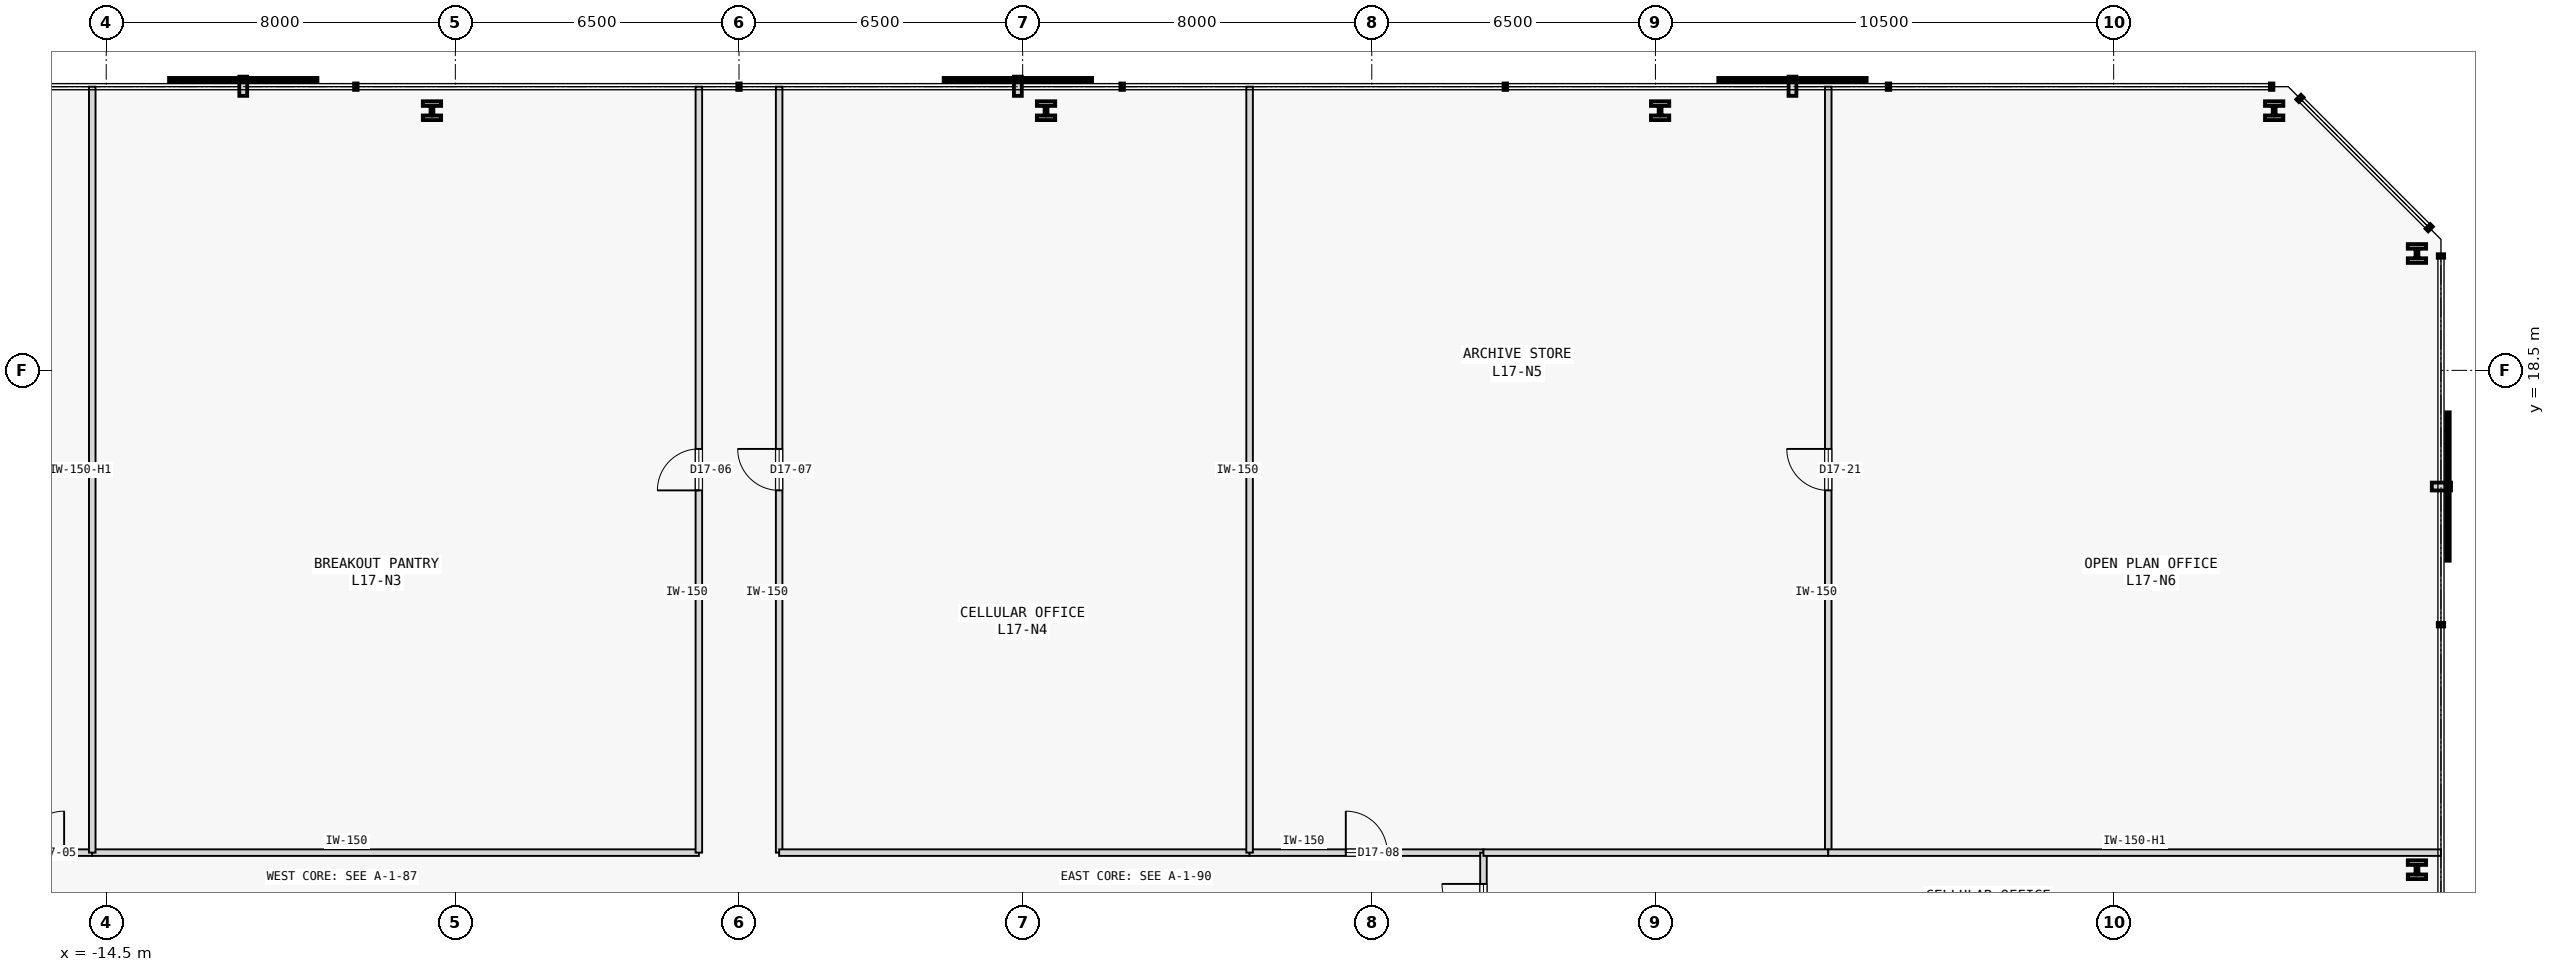
"""IFC4 building model, lengths in metres.
Left out: names, types, materials, properties, quantities, classifications, styles, units other than length and angle.
Written with IfcOpenShell. Run it as: python <this file> out.ifc"""

import sys

from ifc_helpers import new_model, si_unit, direction, frame, frame_2d, origin, origin_2d, place, context, subcontext, project, spatial, rectangle, i_section, extrude, element, fill, save


model = new_model("IFC4")
c1 = context("Model", 3, precision=1e-05, world=origin(), true_north=direction((0.0, 1.0)))
c2 = subcontext(c1, "Body", "Model", "MODEL_VIEW")
j1 = project(units=[si_unit("LENGTHUNIT", "METRE"), si_unit("PLANEANGLEUNIT", "RADIAN")], contexts=[c1])
p1 = place(None, origin())
s1 = spatial("IfcSite", under=j1, at=p1, CompositionType="ELEMENT")
p2 = place(p1, origin())
s2 = spatial("IfcBuilding", under=s1, at=p2, CompositionType="ELEMENT")
p3 = place(p2, frame((0.0, 0.0, 71.2)))
s3 = spatial("IfcBuildingStorey", under=s2, at=p3, CompositionType="ELEMENT", Elevation=71.2)
for number, where, z_axis, x_axis in (
    (1, (38.45, 7.059, 0.0), (0.0, 0.0, 1.0), (1.0, 0.0, 0.0)),
    (2, (38.45, 21.178, 0.0), (0.0, 0.0, 1.0), (1.0, 0.0, 0.0)),
    (3, (35.178, 24.45, 0.0), (0.0, 0.0, 1.0), (1.0, 0.0, 0.0)),
    (4, (21.107, 24.45, 0.0), (0.0, 0.0, 1.0), (1.0, 0.0, 0.0)),
    (5, (7.036, 24.45, 0.0), (0.0, 0.0, 1.0), (1.0, 0.0, 0.0)),
    (6, (-7.036, 24.45, 0.0), (0.0, 0.0, 1.0), (1.0, 0.0, 0.0)),
):
    element("IfcColumn", number, at=place(p3, frame(where, z_axis=z_axis, x_axis=x_axis)), inside=s3, PredefinedType="COLUMN", context=c2, shape_type="SweptSolid", body=[
        extrude(i_section(OverallWidth=0.42, OverallDepth=0.431, WebThickness=0.065, FlangeThickness=0.106, FilletRadius=0.015, at=origin_2d()), origin(), (0.0, 0.0, 1.0), 3.8),
    ])
p4 = place(p3, frame((-17.059, 7.45, 0.0), z_axis=(0.0, 0.0, 1.0), x_axis=(1.0, 0.0, 0.0)))
e7 = element("IfcWall", 7, at=p4, inside=s3, PredefinedType="PARTITIONING", context=c2, shape_type="SweptSolid", body=[
    extrude(rectangle(XDim=2.239, YDim=0.15, at=frame_2d((1.12, 0.0))), origin(), (0.0, 0.0, 1.0), 3.575),
])
p5 = place(p4, frame((0.645, 0.0, 0.0)))
e8 = element("IfcOpeningElement", 8, at=p5, cuts=e7, PredefinedType="OPENING", context=c2, shape_type="SweptSolid", body=[
    extrude(rectangle(XDim=0.95, YDim=2.15, at=frame_2d((0.475, 1.075))), frame((0.0, 0.085, 0.0), z_axis=(0.0, -1.0, 0.0), x_axis=(1.0, 0.0, 0.0)), (0.0, 0.0, 1.0), 0.17),
])
p6 = place(p3, frame((-14.82, 7.45, 0.0), z_axis=(0.0, 0.0, 1.0), x_axis=(1.0, 0.0, 0.0)))
e9 = element("IfcWall", 9, at=p6, inside=s3, PredefinedType="PARTITIONING", context=c2, shape_type="SweptSolid", body=[
    extrude(rectangle(XDim=13.9, YDim=0.15, at=frame_2d((6.95, 0.0))), origin(), (0.0, 0.0, 1.0), 3.575),
])
p7 = place(p3, frame((-0.92, 7.45, 0.0), z_axis=(0.0, 0.0, 1.0), x_axis=(0.0, 1.0, 0.0)))
e10 = element("IfcWall", 10, at=p7, inside=s3, PredefinedType="PARTITIONING", context=c2, shape_type="SweptSolid", body=[
    extrude(rectangle(XDim=17.55, YDim=0.15, at=frame_2d((8.775, 0.0))), origin(), (0.0, 0.0, 1.0), 3.575),
])
p8 = place(p7, frame((8.3, 0.0, 0.0)))
e11 = element("IfcOpeningElement", 11, at=p8, cuts=e10, PredefinedType="OPENING", context=c2, shape_type="SweptSolid", body=[
    extrude(rectangle(XDim=0.95, YDim=2.15, at=frame_2d((0.475, 1.075))), frame((0.0, 0.085, 0.0), z_axis=(0.0, -1.0, 0.0), x_axis=(1.0, 0.0, 0.0)), (0.0, 0.0, 1.0), 0.17),
])
p9 = place(p3, frame((0.92, 7.45, 0.0), z_axis=(0.0, 0.0, 1.0), x_axis=(0.0, 1.0, 0.0)))
e12 = element("IfcWall", 12, at=p9, inside=s3, PredefinedType="PARTITIONING", context=c2, shape_type="SweptSolid", body=[
    extrude(rectangle(XDim=17.55, YDim=0.15, at=frame_2d((8.775, 0.0))), origin(), (0.0, 0.0, 1.0), 3.575),
])
p10 = place(p9, frame((8.3, 0.0, 0.0)))
e13 = element("IfcOpeningElement", 13, at=p10, cuts=e12, PredefinedType="OPENING", context=c2, shape_type="SweptSolid", body=[
    extrude(rectangle(XDim=0.95, YDim=2.15, at=frame_2d((0.475, 1.075))), frame((0.0, 0.085, 0.0), z_axis=(0.0, -1.0, 0.0), x_axis=(1.0, 0.0, 0.0)), (0.0, 0.0, 1.0), 0.17),
])
p11 = place(p3, frame((0.92, 7.45, 0.0), z_axis=(0.0, 0.0, 1.0), x_axis=(1.0, 0.0, 0.0)))
e14 = element("IfcWall", 14, at=p11, inside=s3, PredefinedType="PARTITIONING", context=c2, shape_type="SweptSolid", body=[
    extrude(rectangle(XDim=10.78, YDim=0.15, at=frame_2d((5.39, 0.0))), origin(), (0.0, 0.0, 1.0), 3.575),
])
p12 = place(p3, frame((11.7, 7.45, 0.0), z_axis=(0.0, 0.0, 1.0), x_axis=(1.0, 0.0, 0.0)))
e15 = element("IfcWall", 15, at=p12, inside=s3, PredefinedType="PARTITIONING", context=c2, shape_type="SweptSolid", body=[
    extrude(rectangle(XDim=5.359, YDim=0.15, at=frame_2d((2.68, 0.0))), origin(), (0.0, 0.0, 1.0), 3.575),
])
p13 = place(p12, frame((2.205, 0.0, 0.0)))
e16 = element("IfcOpeningElement", 16, at=p13, cuts=e15, PredefinedType="OPENING", context=c2, shape_type="SweptSolid", body=[
    extrude(rectangle(XDim=0.95, YDim=2.15, at=frame_2d((0.475, 1.075))), frame((0.0, 0.085, 0.0), z_axis=(0.0, -1.0, 0.0), x_axis=(1.0, 0.0, 0.0)), (0.0, 0.0, 1.0), 0.17),
])
p14 = place(p3, frame((17.059, 5.066, 0.0), z_axis=(0.0, 0.0, 1.0), x_axis=(0.0, 1.0, 0.0)))
e17 = element("IfcWall", 17, at=p14, inside=s3, PredefinedType="PARTITIONING", context=c2, shape_type="SweptSolid", body=[
    extrude(rectangle(XDim=2.384, YDim=0.15, at=frame_2d((1.192, 0.0))), origin(), (0.0, 0.0, 1.0), 3.575),
])
p15 = place(p14, frame((0.717, 0.0, 0.0)))
e18 = element("IfcOpeningElement", 18, at=p15, cuts=e17, PredefinedType="OPENING", context=c2, shape_type="SweptSolid", body=[
    extrude(rectangle(XDim=0.95, YDim=2.15, at=frame_2d((0.475, 1.075))), frame((0.0, 0.085, 0.0), z_axis=(0.0, -1.0, 0.0), x_axis=(1.0, 0.0, 0.0)), (0.0, 0.0, 1.0), 0.17),
])
p16 = place(p3, frame((-14.82, 7.45, 0.0), z_axis=(0.0, 0.0, 1.0), x_axis=(0.0, 1.0, 0.0)))
e19 = element("IfcWall", 19, at=p16, inside=s3, PredefinedType="PARTITIONING", context=c2, shape_type="SweptSolid", body=[
    extrude(rectangle(XDim=17.55, YDim=0.15, at=frame_2d((8.775, 0.0))), origin(), (0.0, 0.0, 1.0), 3.125),
])
p17 = place(p3, frame((11.7, 7.45, 0.0), z_axis=(0.0, 0.0, 1.0), x_axis=(0.0, 1.0, 0.0)))
e20 = element("IfcWall", 20, at=p17, inside=s3, PredefinedType="PARTITIONING", context=c2, shape_type="SweptSolid", body=[
    extrude(rectangle(XDim=17.55, YDim=0.15, at=frame_2d((8.775, 0.0))), origin(), (0.0, 0.0, 1.0), 3.575),
])
p18 = place(p3, frame((24.96, 7.45, 0.0), z_axis=(0.0, 0.0, 1.0), x_axis=(0.0, 1.0, 0.0)))
e21 = element("IfcWall", 21, at=p18, inside=s3, PredefinedType="PARTITIONING", context=c2, shape_type="SweptSolid", body=[
    extrude(rectangle(XDim=17.55, YDim=0.15, at=frame_2d((8.775, 0.0))), origin(), (0.0, 0.0, 1.0), 3.575),
])
p19 = place(p18, frame((8.3, 0.0, 0.0)))
e22 = element("IfcOpeningElement", 22, at=p19, cuts=e21, PredefinedType="OPENING", context=c2, shape_type="SweptSolid", body=[
    extrude(rectangle(XDim=0.95, YDim=2.15, at=frame_2d((0.475, 1.075))), frame((0.0, 0.085, 0.0), z_axis=(0.0, -1.0, 0.0), x_axis=(1.0, 0.0, 0.0)), (0.0, 0.0, 1.0), 0.17),
])
p20 = place(p3, frame((17.059, 7.45, 0.0), z_axis=(0.0, 0.0, 1.0), x_axis=(1.0, 0.0, 0.0)))
e23 = element("IfcWall", 23, at=p20, inside=s3, PredefinedType="PARTITIONING", context=c2, shape_type="SweptSolid", body=[
    extrude(rectangle(XDim=7.901, YDim=0.15, at=frame_2d((3.95, 0.0))), origin(), (0.0, 0.0, 1.0), 3.575),
])
p21 = place(p3, frame((24.96, 7.45, 0.0), z_axis=(0.0, 0.0, 1.0), x_axis=(1.0, 0.0, 0.0)))
e24 = element("IfcWall", 24, at=p21, inside=s3, PredefinedType="PARTITIONING", context=c2, shape_type="SweptSolid", body=[
    extrude(rectangle(XDim=14.04, YDim=0.15, at=frame_2d((7.02, 0.0))), origin(), (0.0, 0.0, 1.0), 3.125),
])
p22 = place(p5, origin())
e25 = element("IfcDoor", 25, at=p22, inside=s3, OperationType="SINGLE_SWING_RIGHT", PredefinedType="DOOR", context=c2, shape_type="SweptSolid", body=[
    extrude(rectangle(XDim=0.95, YDim=2.15, at=frame_2d((0.475, 1.075))), frame((0.0, 0.025, 0.0), z_axis=(0.0, -1.0, 0.0), x_axis=(1.0, 0.0, 0.0)), (0.0, 0.0, 1.0), 0.05),
])
fill(e8, e25)
p23 = place(p8, origin())
e26 = element("IfcDoor", 26, at=p23, inside=s3, OperationType="SINGLE_SWING_LEFT", PredefinedType="DOOR", context=c2, shape_type="SweptSolid", body=[
    extrude(rectangle(XDim=0.95, YDim=2.15, at=frame_2d((0.475, 1.075))), frame((0.0, 0.025, 0.0), z_axis=(0.0, -1.0, 0.0), x_axis=(1.0, 0.0, 0.0)), (0.0, 0.0, 1.0), 0.05),
])
fill(e11, e26)
p24 = place(p10, origin())
e27 = element("IfcDoor", 27, at=p24, inside=s3, OperationType="SINGLE_SWING_RIGHT", PredefinedType="DOOR", context=c2, shape_type="SweptSolid", body=[
    extrude(rectangle(XDim=0.95, YDim=2.15, at=frame_2d((0.475, 1.075))), frame((0.0, 0.025, 0.0), z_axis=(0.0, -1.0, 0.0), x_axis=(1.0, 0.0, 0.0)), (0.0, 0.0, 1.0), 0.05),
])
fill(e13, e27)
p25 = place(p13, origin())
e28 = element("IfcDoor", 28, at=p25, inside=s3, OperationType="SINGLE_SWING_LEFT", PredefinedType="DOOR", context=c2, shape_type="SweptSolid", body=[
    extrude(rectangle(XDim=0.95, YDim=2.15, at=frame_2d((0.475, 1.075))), frame((0.0, 0.025, 0.0), z_axis=(0.0, -1.0, 0.0), x_axis=(1.0, 0.0, 0.0)), (0.0, 0.0, 1.0), 0.05),
])
fill(e16, e28)
p26 = place(p15, origin())
e29 = element("IfcDoor", 29, at=p26, inside=s3, OperationType="SINGLE_SWING_RIGHT", PredefinedType="DOOR", context=c2, shape_type="SweptSolid", body=[
    extrude(rectangle(XDim=0.95, YDim=2.15, at=frame_2d((0.475, 1.075))), frame((0.0, 0.025, 0.0), z_axis=(0.0, -1.0, 0.0), x_axis=(1.0, 0.0, 0.0)), (0.0, 0.0, 1.0), 0.05),
])
fill(e18, e29)
p27 = place(p19, origin())
e30 = element("IfcDoor", 30, at=p27, inside=s3, OperationType="SINGLE_SWING_RIGHT", PredefinedType="DOOR", context=c2, shape_type="SweptSolid", body=[
    extrude(rectangle(XDim=0.95, YDim=2.15, at=frame_2d((0.475, 1.075))), frame((0.0, 0.025, 0.0), z_axis=(0.0, -1.0, 0.0), x_axis=(1.0, 0.0, 0.0)), (0.0, 0.0, 1.0), 0.05),
])
fill(e22, e30)
save(model, sys.argv[1])
